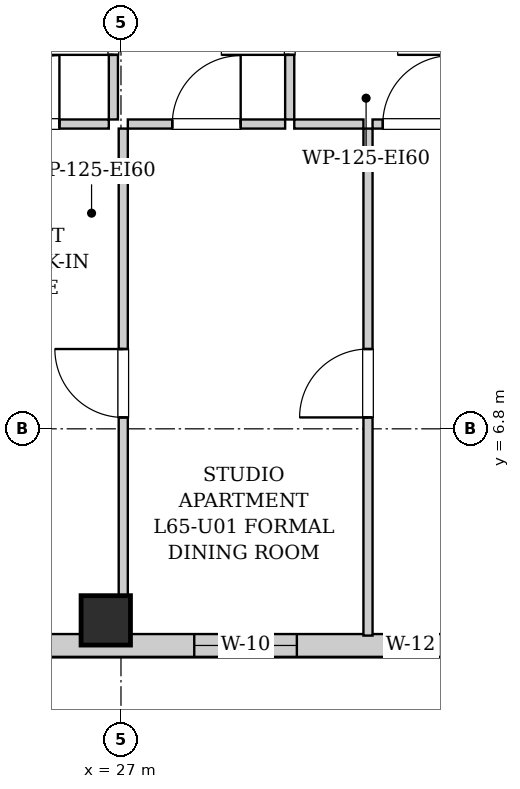
"""IFC4 building model, lengths in metres.
Left out: names, types, materials, properties, quantities, classifications, styles, units other than length and angle.
Written with IfcOpenShell. Run it as: python <this file> out.ifc"""

import sys

from ifc_helpers import new_model, si_unit, direction, frame, frame_2d, origin, origin_2d, place, context, subcontext, project, spatial, rectangle, extrude, element, fill, save


model = new_model("IFC4")
c1 = context("Model", 3, precision=1e-05, world=origin(), true_north=direction((0.0, 1.0)))
c2 = subcontext(c1, "Body", "Model", "MODEL_VIEW")
j1 = project(units=[si_unit("LENGTHUNIT", "METRE"), si_unit("PLANEANGLEUNIT", "RADIAN")], contexts=[c1])
p1 = place(None, origin())
s1 = spatial("IfcSite", under=j1, at=p1, CompositionType="ELEMENT")
p2 = place(p1, origin())
s2 = spatial("IfcBuilding", under=s1, at=p2, CompositionType="ELEMENT")
p3 = place(p2, frame((0.0, 0.0, 224.1)))
s3 = spatial("IfcBuildingStorey", under=s2, at=p3, CompositionType="ELEMENT", Elevation=224.1)
p4 = place(p3, frame((26.8, 4.28, 0.0), z_axis=(0.0, 0.0, 1.0), x_axis=(1.0, 0.0, 0.0)))
e1 = element("IfcColumn", 1, at=p4, inside=s3, PredefinedType="COLUMN", context=c2, shape_type="SweptSolid", body=[
    extrude(rectangle(XDim=0.65, YDim=0.65, at=origin_2d()), origin(), (0.0, 0.0, 1.0), 3.4),
])
p5 = place(p3, frame((31.5, 3.95, 0.0), z_axis=(0.0, 0.0, 1.0), x_axis=(-1.0, 0.0, 0.0)))
e2 = element("IfcWall", 2, at=p5, inside=s3, PredefinedType="SOLIDWALL", context=c2, shape_type="SweptSolid", body=[
    extrude(rectangle(XDim=12.5, YDim=0.3, at=frame_2d((6.25, 0.0))), origin(), (0.0, 0.0, 1.0), 3.14),
])
p6 = place(p5, frame((11.171, 0.0, 0.55)))
e3 = element("IfcOpeningElement", 3, at=p6, cuts=e2, PredefinedType="OPENING", context=c2, shape_type="SweptSolid", body=[
    extrude(rectangle(XDim=0.85, YDim=1.2, at=frame_2d((0.425, 0.6))), frame((0.0, 0.16, 0.0), z_axis=(0.0, -1.0, 0.0), x_axis=(1.0, 0.0, 0.0)), (0.0, 0.0, 1.0), 0.32),
])
p7 = place(p5, frame((9.0, 0.0, 0.55)))
e4 = element("IfcOpeningElement", 4, at=p7, cuts=e2, PredefinedType="OPENING", context=c2, shape_type="SweptSolid", body=[
    extrude(rectangle(XDim=1.35, YDim=1.2, at=frame_2d((0.675, 0.6))), frame((0.0, 0.16, 0.0), z_axis=(0.0, -1.0, 0.0), x_axis=(1.0, 0.0, 0.0)), (0.0, 0.0, 1.0), 0.32),
])
p8 = place(p5, frame((2.186, 0.0, 0.55)))
e5 = element("IfcOpeningElement", 5, at=p8, cuts=e2, PredefinedType="OPENING", context=c2, shape_type="SweptSolid", body=[
    extrude(rectangle(XDim=1.35, YDim=1.2, at=frame_2d((0.675, 0.6))), frame((0.0, 0.16, 0.0), z_axis=(0.0, -1.0, 0.0), x_axis=(1.0, 0.0, 0.0)), (0.0, 0.0, 1.0), 0.32),
])
p9 = place(p5, frame((0.35, 0.0, 0.55)))
e6 = element("IfcOpeningElement", 6, at=p9, cuts=e2, PredefinedType="OPENING", context=c2, shape_type="SweptSolid", body=[
    extrude(rectangle(XDim=0.68, YDim=1.2, at=frame_2d((0.34, 0.6))), frame((0.0, 0.16, 0.0), z_axis=(0.0, -1.0, 0.0), x_axis=(1.0, 0.0, 0.0)), (0.0, 0.0, 1.0), 0.32),
])
p10 = place(p3, frame((26.9, 10.87, 0.0), z_axis=(0.0, 0.0, 1.0), x_axis=(0.0, 1.0, 0.0)))
e7 = element("IfcWall", 7, at=p10, inside=s3, PredefinedType="PARTITIONING", context=c2, shape_type="SweptSolid", body=[
    extrude(rectangle(XDim=2.6, YDim=0.12, at=frame_2d((1.3, 0.0))), origin(), (0.0, 0.0, 1.0), 3.14),
])
p11 = place(p10, frame((0.85, 0.0, 0.0)))
e8 = element("IfcOpeningElement", 8, at=p11, cuts=e7, PredefinedType="OPENING", context=c2, shape_type="SweptSolid", body=[
    extrude(rectangle(XDim=0.9, YDim=2.05, at=frame_2d((0.45, 1.025))), frame((0.0, 0.07, 0.0), z_axis=(0.0, -1.0, 0.0), x_axis=(1.0, 0.0, 0.0)), (0.0, 0.0, 1.0), 0.14),
])
p12 = place(p3, frame((24.64, 10.81, 0.0), z_axis=(0.0, 0.0, 1.0), x_axis=(1.0, 0.0, 0.0)))
e9 = element("IfcWall", 9, at=p12, inside=s3, PredefinedType="PARTITIONING", context=c2, shape_type="SweptSolid", body=[
    extrude(rectangle(XDim=2.2, YDim=0.12, at=frame_2d((1.1, 0.0))), origin(), (0.0, 0.0, 1.0), 3.14),
])
p13 = place(p12, frame((0.65, 0.0, 0.0)))
e10 = element("IfcOpeningElement", 10, at=p13, cuts=e9, PredefinedType="OPENING", context=c2, shape_type="SweptSolid", body=[
    extrude(rectangle(XDim=0.9, YDim=2.05, at=frame_2d((0.45, 1.025))), frame((0.0, 0.07, 0.0), z_axis=(0.0, -1.0, 0.0), x_axis=(1.0, 0.0, 0.0)), (0.0, 0.0, 1.0), 0.14),
])
p14 = place(p3, frame((29.22, 10.87, 0.0), z_axis=(0.0, 0.0, 1.0), x_axis=(0.0, 1.0, 0.0)))
e11 = element("IfcWall", 11, at=p14, inside=s3, PredefinedType="PARTITIONING", context=c2, shape_type="SweptSolid", body=[
    extrude(rectangle(XDim=2.6, YDim=0.12, at=frame_2d((1.3, 0.0))), origin(), (0.0, 0.0, 1.0), 3.14),
])
p15 = place(p14, frame((0.85, 0.0, 0.0)))
e12 = element("IfcOpeningElement", 12, at=p15, cuts=e11, PredefinedType="OPENING", context=c2, shape_type="SweptSolid", body=[
    extrude(rectangle(XDim=0.9, YDim=2.05, at=frame_2d((0.45, 1.025))), frame((0.0, 0.07, 0.0), z_axis=(0.0, -1.0, 0.0), x_axis=(1.0, 0.0, 0.0)), (0.0, 0.0, 1.0), 0.14),
])
p16 = place(p3, frame((27.09, 10.81, 0.0), z_axis=(0.0, 0.0, 1.0), x_axis=(1.0, 0.0, 0.0)))
e13 = element("IfcWall", 13, at=p16, inside=s3, PredefinedType="PARTITIONING", context=c2, shape_type="SweptSolid", body=[
    extrude(rectangle(XDim=2.07, YDim=0.12, at=frame_2d((1.035, 0.0))), origin(), (0.0, 0.0, 1.0), 3.14),
])
p17 = place(p16, frame((0.585, 0.0, 0.0)))
e14 = element("IfcOpeningElement", 14, at=p17, cuts=e13, PredefinedType="OPENING", context=c2, shape_type="SweptSolid", body=[
    extrude(rectangle(XDim=0.9, YDim=2.05, at=frame_2d((0.45, 1.025))), frame((0.0, 0.07, 0.0), z_axis=(0.0, -1.0, 0.0), x_axis=(1.0, 0.0, 0.0)), (0.0, 0.0, 1.0), 0.14),
])
p18 = place(p3, frame((29.28, 10.81, 0.0), z_axis=(0.0, 0.0, 1.0), x_axis=(1.0, 0.0, 0.0)))
e15 = element("IfcWall", 15, at=p18, inside=s3, PredefinedType="PARTITIONING", context=c2, shape_type="SweptSolid", body=[
    extrude(rectangle(XDim=0.91, YDim=0.12, at=frame_2d((0.455, 0.0))), origin(), (0.0, 0.0, 1.0), 3.14),
])
p19 = place(p3, frame((30.31, 10.81, 0.0), z_axis=(0.0, 0.0, 1.0), x_axis=(1.0, 0.0, 0.0)))
e16 = element("IfcWall", 16, at=p19, inside=s3, PredefinedType="PARTITIONING", context=c2, shape_type="SweptSolid", body=[
    extrude(rectangle(XDim=1.17, YDim=0.12, at=frame_2d((0.585, 0.0))), origin(), (0.0, 0.0, 1.0), 3.14),
])
p20 = place(p19, frame((0.135, 0.0, 0.0)))
e17 = element("IfcOpeningElement", 17, at=p20, cuts=e16, PredefinedType="OPENING", context=c2, shape_type="SweptSolid", body=[
    extrude(rectangle(XDim=0.9, YDim=2.05, at=frame_2d((0.45, 1.025))), frame((0.0, 0.07, 0.0), z_axis=(0.0, -1.0, 0.0), x_axis=(1.0, 0.0, 0.0)), (0.0, 0.0, 1.0), 0.14),
])
p21 = place(p3, frame((27.03, 4.08, 0.0), z_axis=(0.0, 0.0, 1.0), x_axis=(0.0, 1.0, 0.0)))
e18 = element("IfcWall", 18, at=p21, inside=s3, PredefinedType="PARTITIONING", context=c2, shape_type="SweptSolid", body=[
    extrude(rectangle(XDim=6.67, YDim=0.12, at=frame_2d((3.335, 0.0))), origin(), (0.0, 0.0, 1.0), 3.14),
])
p22 = place(p21, frame((2.87, 0.0, 0.0)))
e19 = element("IfcOpeningElement", 19, at=p22, cuts=e18, PredefinedType="OPENING", context=c2, shape_type="SweptSolid", body=[
    extrude(rectangle(XDim=0.9, YDim=2.05, at=frame_2d((0.45, 1.025))), frame((0.0, 0.07, 0.0), z_axis=(0.0, -1.0, 0.0), x_axis=(1.0, 0.0, 0.0)), (0.0, 0.0, 1.0), 0.14),
])
p23 = place(p3, frame((30.25, 4.08, 0.0), z_axis=(0.0, 0.0, 1.0), x_axis=(0.0, 1.0, 0.0)))
e20 = element("IfcWall", 20, at=p23, inside=s3, PredefinedType="PARTITIONING", context=c2, shape_type="SweptSolid", body=[
    extrude(rectangle(XDim=6.67, YDim=0.12, at=frame_2d((3.335, 0.0))), origin(), (0.0, 0.0, 1.0), 3.14),
])
p24 = place(p23, frame((2.87, 0.0, 0.0)))
e21 = element("IfcOpeningElement", 21, at=p24, cuts=e20, PredefinedType="OPENING", context=c2, shape_type="SweptSolid", body=[
    extrude(rectangle(XDim=0.9, YDim=2.05, at=frame_2d((0.45, 1.025))), frame((0.0, 0.07, 0.0), z_axis=(0.0, -1.0, 0.0), x_axis=(1.0, 0.0, 0.0)), (0.0, 0.0, 1.0), 0.14),
])
p25 = place(p11, origin())
e22 = element("IfcDoor", 22, at=p25, inside=s3, OperationType="SINGLE_SWING_LEFT", PredefinedType="DOOR", context=c2, shape_type="SweptSolid", body=[
    extrude(rectangle(XDim=0.9, YDim=2.05, at=frame_2d((0.45, 1.025))), frame((0.0, 0.025, 0.0), z_axis=(0.0, -1.0, 0.0), x_axis=(1.0, 0.0, 0.0)), (0.0, 0.0, 1.0), 0.05),
])
fill(e8, e22)
p26 = place(p13, origin())
e23 = element("IfcDoor", 23, at=p26, inside=s3, OperationType="SINGLE_SWING_RIGHT", PredefinedType="DOOR", context=c2, shape_type="SweptSolid", body=[
    extrude(rectangle(XDim=0.9, YDim=2.05, at=frame_2d((0.45, 1.025))), frame((0.0, 0.025, 0.0), z_axis=(0.0, -1.0, 0.0), x_axis=(1.0, 0.0, 0.0)), (0.0, 0.0, 1.0), 0.05),
])
fill(e10, e23)
p27 = place(p15, origin())
e24 = element("IfcDoor", 24, at=p27, inside=s3, OperationType="SINGLE_SWING_LEFT", PredefinedType="DOOR", context=c2, shape_type="SweptSolid", body=[
    extrude(rectangle(XDim=0.9, YDim=2.05, at=frame_2d((0.45, 1.025))), frame((0.0, 0.025, 0.0), z_axis=(0.0, -1.0, 0.0), x_axis=(1.0, 0.0, 0.0)), (0.0, 0.0, 1.0), 0.05),
])
fill(e12, e24)
p28 = place(p17, origin())
e25 = element("IfcDoor", 25, at=p28, inside=s3, OperationType="SINGLE_SWING_RIGHT", PredefinedType="DOOR", context=c2, shape_type="SweptSolid", body=[
    extrude(rectangle(XDim=0.9, YDim=2.05, at=frame_2d((0.45, 1.025))), frame((0.0, 0.025, 0.0), z_axis=(0.0, -1.0, 0.0), x_axis=(1.0, 0.0, 0.0)), (0.0, 0.0, 1.0), 0.05),
])
fill(e14, e25)
p29 = place(p20, origin())
e26 = element("IfcDoor", 26, at=p29, inside=s3, OperationType="SINGLE_SWING_RIGHT", PredefinedType="DOOR", context=c2, shape_type="SweptSolid", body=[
    extrude(rectangle(XDim=0.9, YDim=2.05, at=frame_2d((0.45, 1.025))), frame((0.0, 0.025, 0.0), z_axis=(0.0, -1.0, 0.0), x_axis=(1.0, 0.0, 0.0)), (0.0, 0.0, 1.0), 0.05),
])
fill(e17, e26)
p30 = place(p22, origin())
e27 = element("IfcDoor", 27, at=p30, inside=s3, OperationType="SINGLE_SWING_RIGHT", PredefinedType="DOOR", context=c2, shape_type="SweptSolid", body=[
    extrude(rectangle(XDim=0.9, YDim=2.05, at=frame_2d((0.45, 1.025))), frame((0.0, 0.025, 0.0), z_axis=(0.0, -1.0, 0.0), x_axis=(1.0, 0.0, 0.0)), (0.0, 0.0, 1.0), 0.05),
])
fill(e19, e27)
p31 = place(p24, origin())
e28 = element("IfcDoor", 28, at=p31, inside=s3, OperationType="SINGLE_SWING_LEFT", PredefinedType="DOOR", context=c2, shape_type="SweptSolid", body=[
    extrude(rectangle(XDim=0.9, YDim=2.05, at=frame_2d((0.45, 1.025))), frame((0.0, 0.025, 0.0), z_axis=(0.0, -1.0, 0.0), x_axis=(1.0, 0.0, 0.0)), (0.0, 0.0, 1.0), 0.05),
])
fill(e21, e28)
p32 = place(p8, origin())
e29 = element("IfcWindow", 29, at=p32, inside=s3, PartitioningType="SINGLE_PANEL", PredefinedType="WINDOW", context=c2, shape_type="SweptSolid", body=[
    extrude(rectangle(XDim=1.35, YDim=1.2, at=frame_2d((0.675, 0.6))), frame((0.0, 0.03, 0.0), z_axis=(0.0, -1.0, 0.0), x_axis=(1.0, 0.0, 0.0)), (0.0, 0.0, 1.0), 0.06),
])
fill(e5, e29)
p33 = place(p9, origin())
e30 = element("IfcWindow", 30, at=p33, inside=s3, PartitioningType="SINGLE_PANEL", PredefinedType="WINDOW", context=c2, shape_type="SweptSolid", body=[
    extrude(rectangle(XDim=0.68, YDim=1.2, at=frame_2d((0.34, 0.6))), frame((0.0, 0.03, 0.0), z_axis=(0.0, -1.0, 0.0), x_axis=(1.0, 0.0, 0.0)), (0.0, 0.0, 1.0), 0.06),
])
fill(e6, e30)
save(model, sys.argv[1])
